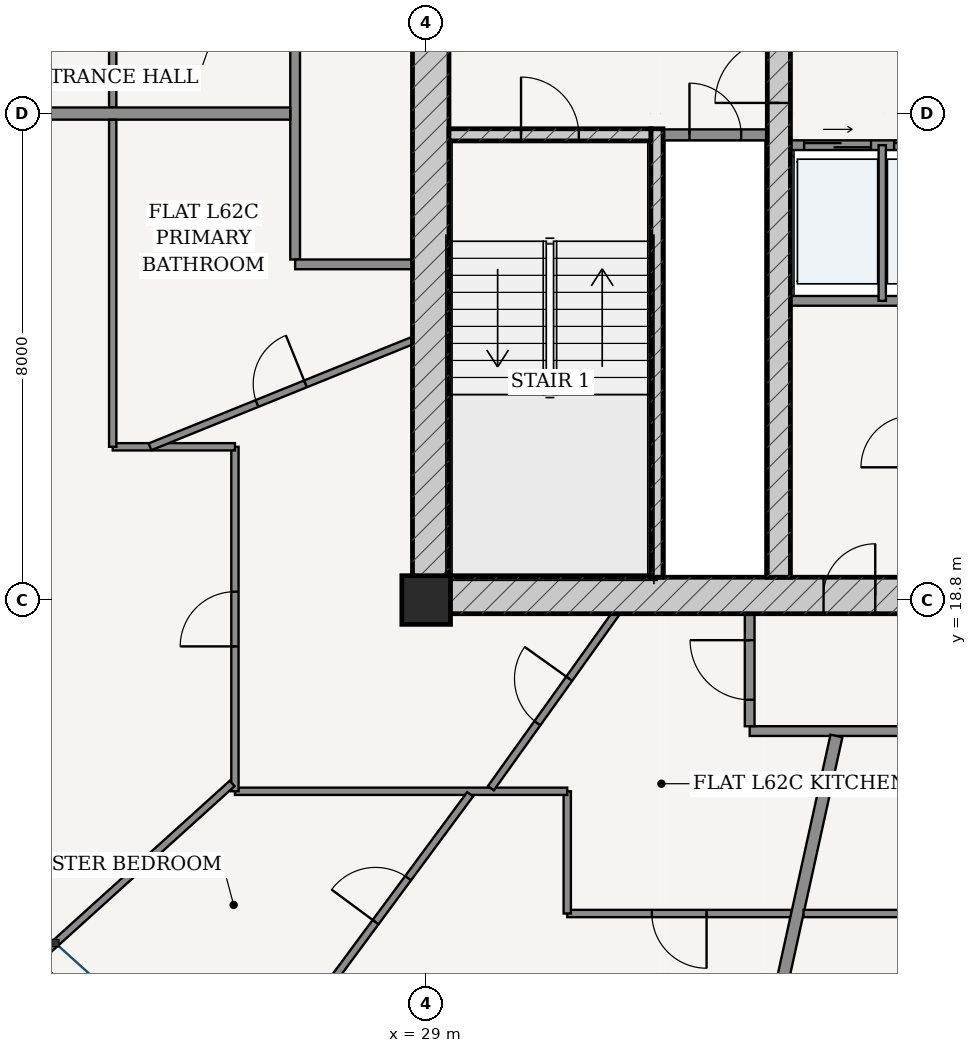
"""IFC4 building model, lengths in metres.
Left out: names, types, materials, properties, quantities, classifications, styles, units other than length and angle.
Written with IfcOpenShell. Run it as: python <this file> out.ifc"""

import sys

from ifc_helpers import new_model, si_unit, direction, frame, frame_2d, origin, origin_2d, place, context, subcontext, project, spatial, rectangle, extrude, source, transform, mapped, element, fill, save


model = new_model("IFC4")
c1 = context("Model", 3, precision=1e-05, world=origin(), true_north=direction((-0.2419218956, 0.970295726276)))
c2 = subcontext(c1, "Body", "Model", "MODEL_VIEW")
j1 = project(units=[si_unit("LENGTHUNIT", "METRE"), si_unit("PLANEANGLEUNIT", "RADIAN")], contexts=[c1])
p1 = place(None, origin())
s1 = spatial("IfcSite", under=j1, at=p1, CompositionType="ELEMENT")
p2 = place(p1, origin())
s2 = spatial("IfcBuilding", under=s1, at=p2, CompositionType="ELEMENT")
p3 = place(p2, frame((0.0, 0.0, 235.6)))
s3 = spatial("IfcBuildingStorey", under=s2, at=p3, CompositionType="ELEMENT", Elevation=235.6)
p4 = place(p3, frame((29.0, 18.8, 0.0), z_axis=(0.0, 0.0, 1.0), x_axis=(1.0, 0.0, 0.0)))
e1 = element("IfcColumn", 1, at=p4, inside=s3, PredefinedType="COLUMN", context=c2, shape_type="SweptSolid", body=[
    extrude(rectangle(XDim=0.8, YDim=0.8, at=origin_2d()), origin(), (0.0, 0.0, 1.0), 3.7),
])
p5 = place(p3, frame((28.775, 18.875, 0.0), z_axis=(0.0, 0.0, 1.0), x_axis=(1.0, 0.0, 0.0)))
e2 = element("IfcWall", 2, at=p5, inside=s3, PredefinedType="SHEAR", context=c2, shape_type="SweptSolid", body=[
    extrude(rectangle(XDim=18.45, YDim=0.6, at=frame_2d((9.225, 0.0))), origin(), (0.0, 0.0, 1.0), 3.435),
])
p6 = place(p5, frame((6.76, 0.0, 0.0)))
e3 = element("IfcOpeningElement", 3, at=p6, cuts=e2, PredefinedType="OPENING", context=c2, shape_type="SweptSolid", body=[
    extrude(rectangle(XDim=0.85, YDim=2.1, at=frame_2d((0.425, 1.05))), frame((0.0, 0.31, 0.0), z_axis=(0.0, -1.0, 0.0), x_axis=(1.0, 0.0, 0.0)), (0.0, 0.0, 1.0), 0.62),
])
p7 = place(p5, frame((8.8, 0.0, 0.0)))
e4 = element("IfcOpeningElement", 4, at=p7, cuts=e2, PredefinedType="OPENING", context=c2, shape_type="SweptSolid", body=[
    extrude(rectangle(XDim=0.85, YDim=2.1, at=frame_2d((0.425, 1.05))), frame((0.0, 0.31, 0.0), z_axis=(0.0, -1.0, 0.0), x_axis=(1.0, 0.0, 0.0)), (0.0, 0.0, 1.0), 0.62),
])
p8 = place(p5, frame((10.84, 0.0, 0.0)))
e5 = element("IfcOpeningElement", 5, at=p8, cuts=e2, PredefinedType="OPENING", context=c2, shape_type="SweptSolid", body=[
    extrude(rectangle(XDim=0.85, YDim=2.1, at=frame_2d((0.425, 1.05))), frame((0.0, 0.31, 0.0), z_axis=(0.0, -1.0, 0.0), x_axis=(1.0, 0.0, 0.0)), (0.0, 0.0, 1.0), 0.62),
])
p9 = place(p3, frame((29.075, 19.175, 0.0), z_axis=(0.0, 0.0, 1.0), x_axis=(0.0, 1.0, 0.0)))
e6 = element("IfcWall", 6, at=p9, inside=s3, PredefinedType="SHEAR", context=c2, shape_type="SweptSolid", body=[
    extrude(rectangle(XDim=15.25, YDim=0.6, at=frame_2d((7.625, 0.0))), origin(), (0.0, 0.0, 1.0), 3.435),
])
p10 = place(p9, frame((9.875, 0.0, 0.0)))
e7 = element("IfcOpeningElement", 7, at=p10, cuts=e6, PredefinedType="OPENING", context=c2, shape_type="SweptSolid", body=[
    extrude(rectangle(XDim=1.5, YDim=2.2, at=frame_2d((0.75, 1.1))), frame((0.0, 0.31, 0.0), z_axis=(0.0, -1.0, 0.0), x_axis=(1.0, 0.0, 0.0)), (0.0, 0.0, 1.0), 0.62),
])
p11 = place(p3, frame((32.795, 19.175, 0.0), z_axis=(0.0, 0.0, 1.0), x_axis=(0.0, 1.0, 0.0)))
e8 = element("IfcWall", 8, at=p11, inside=s3, PredefinedType="SOLIDWALL", context=c2, shape_type="SweptSolid", body=[
    extrude(rectangle(XDim=7.375, YDim=0.2, at=frame_2d((3.688, 0.0))), origin(), (0.0, 0.0, 1.0), 3.435),
])
p12 = place(p3, frame((29.375, 26.45, 0.0), z_axis=(0.0, 0.0, 1.0), x_axis=(1.0, 0.0, 0.0)))
e9 = element("IfcWall", 9, at=p12, inside=s3, PredefinedType="SOLIDWALL", context=c2, shape_type="SweptSolid", body=[
    extrude(rectangle(XDim=3.32, YDim=0.2, at=frame_2d((1.66, 0.0))), origin(), (0.0, 0.0, 1.0), 3.435),
])
p13 = place(p12, frame((1.185, 0.0, 0.0)))
e10 = element("IfcOpeningElement", 10, at=p13, cuts=e9, PredefinedType="OPENING", context=c2, shape_type="SweptSolid", body=[
    extrude(rectangle(XDim=0.95, YDim=2.15, at=frame_2d((0.475, 1.075))), frame((0.0, 0.11, 0.0), z_axis=(0.0, -1.0, 0.0), x_axis=(1.0, 0.0, 0.0)), (0.0, 0.0, 1.0), 0.22),
])
p14 = place(p3, frame((34.8, 19.175, 0.0), z_axis=(0.0, 0.0, 1.0), x_axis=(0.0, 1.0, 0.0)))
e11 = element("IfcWall", 11, at=p14, inside=s3, PredefinedType="SHEAR", context=c2, shape_type="SweptSolid", body=[
    extrude(rectangle(XDim=15.25, YDim=0.38, at=frame_2d((7.625, 0.0))), origin(), (0.0, 0.0, 1.0), 3.435),
])
p15 = place(p14, frame((7.8, 0.0, 0.0)))
e12 = element("IfcOpeningElement", 12, at=p15, cuts=e11, PredefinedType="OPENING", context=c2, shape_type="SweptSolid", body=[
    extrude(rectangle(XDim=1.05, YDim=2.15, at=frame_2d((0.525, 1.075))), frame((0.0, 0.2, 0.0), z_axis=(0.0, -1.0, 0.0), x_axis=(1.0, 0.0, 0.0)), (0.0, 0.0, 1.0), 0.4),
])
p16 = place(p3, frame((32.9, 26.45, 0.0), z_axis=(0.0, 0.0, 1.0), x_axis=(1.0, 0.0, 0.0)))
e13 = element("IfcWall", 13, at=p16, inside=s3, PredefinedType="PARTITIONING", context=c2, shape_type="SweptSolid", body=[
    extrude(rectangle(XDim=1.71, YDim=0.18, at=frame_2d((0.855, 0.0))), origin(), (0.0, 0.0, 1.0), 3.435),
])
p17 = place(p16, frame((0.43, 0.0, 0.0)))
e14 = element("IfcOpeningElement", 14, at=p17, cuts=e13, PredefinedType="OPENING", context=c2, shape_type="SweptSolid", body=[
    extrude(rectangle(XDim=0.85, YDim=2.1, at=frame_2d((0.425, 1.05))), frame((0.0, 0.1, 0.0), z_axis=(0.0, -1.0, 0.0), x_axis=(1.0, 0.0, 0.0)), (0.0, 0.0, 1.0), 0.2),
])
p18 = place(p3, frame((34.99, 26.28, 0.0), z_axis=(0.0, 0.0, 1.0), x_axis=(1.0, 0.0, 0.0)))
e15 = element("IfcWall", 15, at=p18, inside=s3, PredefinedType="PARTITIONING", context=c2, shape_type="SweptSolid", body=[
    extrude(rectangle(XDim=6.02, YDim=0.16, at=frame_2d((3.01, 0.0))), origin(), (0.0, 0.0, 1.0), 3.435),
])
p19 = place(p18, frame((0.225, 0.0, 0.0)))
e16 = element("IfcOpeningElement", 16, at=p19, cuts=e15, PredefinedType="OPENING", context=c2, shape_type="SweptSolid", body=[
    extrude(rectangle(XDim=1.1, YDim=2.2, at=frame_2d((0.55, 1.1))), frame((0.0, 0.09, 0.0), z_axis=(0.0, -1.0, 0.0), x_axis=(1.0, 0.0, 0.0)), (0.0, 0.0, 1.0), 0.18),
])
p20 = place(p18, frame((1.705, 0.0, 0.0)))
e17 = element("IfcOpeningElement", 17, at=p20, cuts=e15, PredefinedType="OPENING", context=c2, shape_type="SweptSolid", body=[
    extrude(rectangle(XDim=1.1, YDim=2.2, at=frame_2d((0.55, 1.1))), frame((0.0, 0.09, 0.0), z_axis=(0.0, -1.0, 0.0), x_axis=(1.0, 0.0, 0.0)), (0.0, 0.0, 1.0), 0.18),
])
p21 = place(p3, frame((34.99, 23.72, 0.0), z_axis=(0.0, 0.0, 1.0), x_axis=(1.0, 0.0, 0.0)))
e18 = element("IfcWall", 18, at=p21, inside=s3, PredefinedType="PARTITIONING", context=c2, shape_type="SweptSolid", body=[
    extrude(rectangle(XDim=6.02, YDim=0.16, at=frame_2d((3.01, 0.0))), origin(), (0.0, 0.0, 1.0), 3.435),
])
p22 = place(p3, frame((36.5, 23.72, 0.0), z_axis=(0.0, 0.0, 1.0), x_axis=(0.0, 1.0, 0.0)))
e19 = element("IfcWall", 19, at=p22, inside=s3, PredefinedType="PARTITIONING", context=c2, shape_type="SweptSolid", body=[
    extrude(rectangle(XDim=2.56, YDim=0.12, at=frame_2d((1.28, 0.0))), origin(), (0.0, 0.0, 1.0), 3.435),
])
p23 = place(p3, frame((26.845, 24.4, 0.0), z_axis=(0.0, 0.0, 1.0), x_axis=(0.0, 1.0, 0.0)))
e20 = element("IfcWall", 20, at=p23, inside=s3, PredefinedType="PARTITIONING", context=c2, shape_type="SweptSolid", body=[
    extrude(rectangle(XDim=10.625, YDim=0.16, at=frame_2d((5.312, 0.0))), origin(), (0.0, 0.0, 1.0), 2.951),
])
p24 = place(p23, frame((4.936, 0.0, 0.0)))
e21 = element("IfcOpeningElement", 21, at=p24, cuts=e20, PredefinedType="OPENING", context=c2, shape_type="SweptSolid", body=[
    extrude(rectangle(XDim=0.98, YDim=2.2, at=frame_2d((0.49, 1.1))), frame((0.0, 0.09, 0.0), z_axis=(0.0, -1.0, 0.0), x_axis=(1.0, 0.0, 0.0)), (0.0, 0.0, 1.0), 0.18),
])
p25 = place(p3, frame((26.845, 24.32, 0.0), z_axis=(0.0, 0.0, 1.0), x_axis=(1.0, 0.0, 0.0)))
e22 = element("IfcWall", 22, at=p25, inside=s3, PredefinedType="PARTITIONING", context=c2, shape_type="SweptSolid", body=[
    extrude(rectangle(XDim=1.93, YDim=0.16, at=frame_2d((0.965, 0.0))), origin(), (0.0, 0.0, 1.0), 3.435),
])
p26 = place(p3, frame((34.32, 16.645, 0.0), z_axis=(0.0, 0.0, 1.0), x_axis=(1.0, 0.0, 0.0)))
e23 = element("IfcWall", 23, at=p26, inside=s3, PredefinedType="PARTITIONING", context=c2, shape_type="SweptSolid", body=[
    extrude(rectangle(XDim=14.835, YDim=0.16, at=frame_2d((7.417, 0.0))), origin(), (0.0, 0.0, 1.0), 2.951),
])
p27 = place(p26, frame((9.928, 0.0, 0.0)))
e24 = element("IfcOpeningElement", 24, at=p27, cuts=e23, PredefinedType="OPENING", context=c2, shape_type="SweptSolid", body=[
    extrude(rectangle(XDim=0.98, YDim=2.2, at=frame_2d((0.49, 1.1))), frame((0.0, 0.09, 0.0), z_axis=(0.0, -1.0, 0.0), x_axis=(1.0, 0.0, 0.0)), (0.0, 0.0, 1.0), 0.18),
])
p28 = place(p3, frame((34.32, 16.725, 0.0), z_axis=(0.0, 0.0, 1.0), x_axis=(0.0, 1.0, 0.0)))
e25 = element("IfcWall", 25, at=p28, inside=s3, PredefinedType="PARTITIONING", context=c2, shape_type="SweptSolid", body=[
    extrude(rectangle(XDim=1.85, YDim=0.16, at=frame_2d((0.925, 0.0))), origin(), (0.0, 0.0, 1.0), 3.435),
])
p29 = place(p28, frame((0.435, 0.0, 0.0)))
e26 = element("IfcOpeningElement", 26, at=p29, cuts=e25, PredefinedType="OPENING", context=c2, shape_type="SweptSolid", body=[
    extrude(rectangle(XDim=0.98, YDim=2.2, at=frame_2d((0.49, 1.1))), frame((0.0, 0.09, 0.0), z_axis=(0.0, -1.0, 0.0), x_axis=(1.0, 0.0, 0.0)), (0.0, 0.0, 1.0), 0.18),
])
p30 = place(p3, frame((23.845, 26.902, 0.0), z_axis=(0.0, 0.0, 1.0), x_axis=(0.0, 1.0, 0.0)))
e27 = element("IfcWall", 27, at=p30, inside=s3, PredefinedType="PARTITIONING", context=c2, shape_type="SweptSolid", body=[
    extrude(rectangle(XDim=11.203, YDim=0.12, at=frame_2d((5.602, 0.0))), origin(), (0.0, 0.0, 1.0), 2.951),
])
p31 = place(p30, frame((2.276, 0.0, 0.0)))
e28 = element("IfcOpeningElement", 28, at=p31, cuts=e27, PredefinedType="OPENING", context=c2, shape_type="SweptSolid", body=[
    extrude(rectangle(XDim=0.9, YDim=2.15, at=frame_2d((0.45, 1.075))), frame((0.0, 0.07, 0.0), z_axis=(0.0, -1.0, 0.0), x_axis=(1.0, 0.0, 0.0)), (0.0, 0.0, 1.0), 0.14),
])
p32 = place(p3, frame((26.765, 26.8, 0.0), z_axis=(0.0, 0.0, 1.0), x_axis=(-1.0, 0.0, 0.0)))
e29 = element("IfcWall", 29, at=p32, inside=s3, PredefinedType="PARTITIONING", context=c2, shape_type="SweptSolid", body=[
    extrude(rectangle(XDim=10.505, YDim=0.2, at=frame_2d((5.252, 0.0))), origin(), (0.0, 0.0, 1.0), 2.951),
])
p33 = place(p3, frame((35.002, 13.645, 0.0), z_axis=(0.0, 0.0, 1.0), x_axis=(-1.0, 0.0, 0.0)))
e30 = element("IfcWall", 30, at=p33, inside=s3, PredefinedType="PARTITIONING", context=c2, shape_type="SweptSolid", body=[
    extrude(rectangle(XDim=3.682, YDim=0.12, at=frame_2d((1.841, 0.0))), origin(), (0.0, 0.0, 1.0), 2.951),
])
p34 = place(p33, frame((1.391, 0.0, 0.0)))
e31 = element("IfcOpeningElement", 31, at=p34, cuts=e30, PredefinedType="OPENING", context=c2, shape_type="SweptSolid", body=[
    extrude(rectangle(XDim=0.9, YDim=2.15, at=frame_2d((0.45, 1.075))), frame((0.0, 0.07, 0.0), z_axis=(0.0, -1.0, 0.0), x_axis=(1.0, 0.0, 0.0)), (0.0, 0.0, 1.0), 0.14),
])
p35 = place(p3, frame((31.32, 13.645, 0.0), z_axis=(0.0, 0.0, 1.0), x_axis=(0.0, 1.0, 0.0)))
e32 = element("IfcWall", 32, at=p35, inside=s3, PredefinedType="PARTITIONING", context=c2, shape_type="SweptSolid", body=[
    extrude(rectangle(XDim=2.01, YDim=0.12, at=frame_2d((1.005, 0.0))), origin(), (0.0, 0.0, 1.0), 3.11),
])
p36 = place(p3, frame((31.32, 15.655, 0.0), z_axis=(0.0, 0.0, 1.0), x_axis=(-1.0, 0.0, 0.0)))
e33 = element("IfcWall", 33, at=p36, inside=s3, PredefinedType="PARTITIONING", context=c2, shape_type="SweptSolid", body=[
    extrude(rectangle(XDim=5.465, YDim=0.12, at=frame_2d((2.732, 0.0))), origin(), (0.0, 0.0, 1.0), 2.951),
])
p37 = place(p3, frame((25.855, 15.655, 0.0), z_axis=(0.0, 0.0, 1.0), x_axis=(0.0, 1.0, 0.0)))
e34 = element("IfcWall", 34, at=p37, inside=s3, PredefinedType="PARTITIONING", context=c2, shape_type="SweptSolid", body=[
    extrude(rectangle(XDim=5.665, YDim=0.12, at=frame_2d((2.833, 0.0))), origin(), (0.0, 0.0, 1.0), 2.951),
])
p38 = place(p37, frame((2.383, 0.0, 0.0)))
e35 = element("IfcOpeningElement", 35, at=p38, cuts=e34, PredefinedType="OPENING", context=c2, shape_type="SweptSolid", body=[
    extrude(rectangle(XDim=0.9, YDim=2.15, at=frame_2d((0.45, 1.075))), frame((0.0, 0.07, 0.0), z_axis=(0.0, -1.0, 0.0), x_axis=(1.0, 0.0, 0.0)), (0.0, 0.0, 1.0), 0.14),
])
p39 = place(p3, frame((25.855, 21.32, 0.0), z_axis=(0.0, 0.0, 1.0), x_axis=(-1.0, 0.0, 0.0)))
e36 = element("IfcWall", 36, at=p39, inside=s3, PredefinedType="PARTITIONING", context=c2, shape_type="SweptSolid", body=[
    extrude(rectangle(XDim=2.01, YDim=0.12, at=frame_2d((1.005, 0.0))), origin(), (0.0, 0.0, 1.0), 3.11),
])
p40 = place(p3, frame((23.845, 21.32, 0.0), z_axis=(0.0, 0.0, 1.0), x_axis=(0.0, 1.0, 0.0)))
e37 = element("IfcWall", 37, at=p40, inside=s3, PredefinedType="PARTITIONING", context=c2, shape_type="SweptSolid", body=[
    extrude(rectangle(XDim=5.378, YDim=0.12, at=frame_2d((2.689, 0.0))), origin(), (0.0, 0.0, 1.0), 2.951),
])
p41 = place(p3, frame((25.809, 15.783, 0.0), z_axis=(0.0, 0.0, 1.0), x_axis=(-0.741938009522, -0.670468485483, 0.0)))
e38 = element("IfcWall", 38, at=p41, inside=s3, PredefinedType="PARTITIONING", context=c2, shape_type="SweptSolid", body=[
    extrude(rectangle(XDim=4.284, YDim=0.12, at=frame_2d((2.142, 0.0))), origin(), (0.0, 0.0, 1.0), 2.951),
])
p42 = place(p3, frame((29.722, 15.605, 0.0), z_axis=(0.0, 0.0, 1.0), x_axis=(-0.594518724985, -0.80408176552, 0.0)))
e39 = element("IfcWall", 39, at=p42, inside=s3, PredefinedType="PARTITIONING", context=c2, shape_type="SweptSolid", body=[
    extrude(rectangle(XDim=6.344, YDim=0.12, at=frame_2d((3.172, 0.0))), origin(), (0.0, 0.0, 1.0), 2.951),
])
p43 = place(p42, frame((1.714, 0.0, 0.0)))
e40 = element("IfcOpeningElement", 40, at=p43, cuts=e39, PredefinedType="OPENING", context=c2, shape_type="SweptSolid", body=[
    extrude(rectangle(XDim=0.9, YDim=2.15, at=frame_2d((0.45, 1.075))), frame((0.0, 0.07, 0.0), z_axis=(0.0, -1.0, 0.0), x_axis=(1.0, 0.0, 0.0)), (0.0, 0.0, 1.0), 0.14),
])
p44 = place(p3, frame((28.775, 23.067, 0.0), z_axis=(0.0, 0.0, 1.0), x_axis=(-0.926979373422, -0.375112304851, 0.0)))
e41 = element("IfcWall", 41, at=p44, inside=s3, PredefinedType="PARTITIONING", context=c2, shape_type="SweptSolid", body=[
    extrude(rectangle(XDim=4.656, YDim=0.12, at=frame_2d((2.328, 0.0))), origin(), (0.0, 0.0, 1.0), 3.435),
])
p45 = place(p44, frame((1.898, 0.0, 0.0)))
e42 = element("IfcOpeningElement", 42, at=p45, cuts=e41, PredefinedType="OPENING", context=c2, shape_type="SweptSolid", body=[
    extrude(rectangle(XDim=0.86, YDim=2.15, at=frame_2d((0.43, 1.075))), frame((0.0, 0.07, 0.0), z_axis=(0.0, -1.0, 0.0), x_axis=(1.0, 0.0, 0.0)), (0.0, 0.0, 1.0), 0.14),
])
p46 = place(p3, frame((32.117, 18.575, 0.0), z_axis=(0.0, 0.0, 1.0), x_axis=(-0.581800974427, -0.81333119094, 0.0)))
e43 = element("IfcWall", 43, at=p46, inside=s3, PredefinedType="PARTITIONING", context=c2, shape_type="SweptSolid", body=[
    extrude(rectangle(XDim=3.528, YDim=0.12, at=frame_2d((1.764, 0.0))), origin(), (0.0, 0.0, 1.0), 3.435),
])
p47 = place(p46, frame((1.314, 0.0, 0.0)))
e44 = element("IfcOpeningElement", 44, at=p47, cuts=e43, PredefinedType="OPENING", context=c2, shape_type="SweptSolid", body=[
    extrude(rectangle(XDim=0.9, YDim=2.15, at=frame_2d((0.45, 1.075))), frame((0.0, 0.07, 0.0), z_axis=(0.0, -1.0, 0.0), x_axis=(1.0, 0.0, 0.0)), (0.0, 0.0, 1.0), 0.14),
])
p48 = place(p3, frame((35.747, 16.565, 0.0), z_axis=(0.0, 0.0, 1.0), x_axis=(-0.214957946814, -0.976623305631, 0.0)))
e45 = element("IfcWall", 45, at=p48, inside=s3, PredefinedType="PARTITIONING", context=c2, shape_type="SweptSolid", body=[
    extrude(rectangle(XDim=9.202, YDim=0.2, at=frame_2d((4.601, 0.0))), origin(), (0.0, 0.0, 1.0), 2.951),
])
p49 = place(p3, frame((52.155, 13.645, 0.0), z_axis=(0.0, 0.0, 1.0), x_axis=(-1.0, 0.0, 0.0)))
e46 = element("IfcWall", 46, at=p49, inside=s3, PredefinedType="PARTITIONING", context=c2, shape_type="SweptSolid", body=[
    extrude(rectangle(XDim=16.949, YDim=0.12, at=frame_2d((8.474, 0.0))), origin(), (0.0, 0.0, 1.0), 2.951),
])
p50 = place(p49, frame((7.192, 0.0, 0.0)))
e47 = element("IfcOpeningElement", 47, at=p50, cuts=e46, PredefinedType="OPENING", context=c2, shape_type="SweptSolid", body=[
    extrude(rectangle(XDim=0.9, YDim=2.15, at=frame_2d((0.45, 1.075))), frame((0.0, 0.07, 0.0), z_axis=(0.0, -1.0, 0.0), x_axis=(1.0, 0.0, 0.0)), (0.0, 0.0, 1.0), 0.14),
])
m1 = source(origin(), c2, "Body", "SweptSolid", [
    extrude(rectangle(XDim=1.05, YDim=2.15, at=frame_2d((0.525, 1.075))), frame((0.0, 0.025, 0.0), z_axis=(0.0, -1.0, 0.0), x_axis=(1.0, 0.0, 0.0)), (0.0, 0.0, 1.0), 0.05),
])
p51 = place(p15, origin())
e48 = element("IfcDoor", 48, at=p51, inside=s3, OperationType="SINGLE_SWING_LEFT", PredefinedType="DOOR", context=c2, shape_type="MappedRepresentation", body=[
    mapped(m1, transform((0.0, 0.0, 0.0), scale=1.0)),
])
fill(e12, e48)
m2 = source(origin(), c2, "Body", "SweptSolid", [
    extrude(rectangle(XDim=0.95, YDim=2.15, at=frame_2d((0.475, 1.075))), frame((0.0, 0.025, 0.0), z_axis=(0.0, -1.0, 0.0), x_axis=(1.0, 0.0, 0.0)), (0.0, 0.0, 1.0), 0.05),
])
p52 = place(p13, origin())
e49 = element("IfcDoor", 49, at=p52, inside=s3, OperationType="SINGLE_SWING_LEFT", PredefinedType="DOOR", context=c2, shape_type="MappedRepresentation", body=[
    mapped(m2, transform((0.0, 0.0, 0.0), scale=1.0)),
])
fill(e10, e49)
m3 = source(origin(), c2, "Body", "SweptSolid", [
    extrude(rectangle(XDim=0.85, YDim=2.1, at=frame_2d((0.425, 1.05))), frame((0.0, 0.025, 0.0), z_axis=(0.0, -1.0, 0.0), x_axis=(1.0, 0.0, 0.0)), (0.0, 0.0, 1.0), 0.05),
])
p53 = place(p17, origin())
e50 = element("IfcDoor", 50, at=p53, inside=s3, OperationType="SINGLE_SWING_LEFT", PredefinedType="DOOR", context=c2, shape_type="MappedRepresentation", body=[
    mapped(m3, transform((0.0, 0.0, 0.0), scale=1.0)),
])
fill(e14, e50)
p54 = place(p6, origin())
e51 = element("IfcDoor", 51, at=p54, inside=s3, OperationType="SINGLE_SWING_RIGHT", PredefinedType="DOOR", context=c2, shape_type="MappedRepresentation", body=[
    mapped(m3, transform((0.0, 0.0, 0.0), scale=1.0)),
])
fill(e3, e51)
m4 = source(origin(), c2, "Body", "SweptSolid", [
    extrude(rectangle(XDim=1.1, YDim=2.2, at=frame_2d((0.55, 1.1))), frame((0.0, 0.025, 0.0), z_axis=(0.0, -1.0, 0.0), x_axis=(1.0, 0.0, 0.0)), (0.0, 0.0, 1.0), 0.05),
])
p55 = place(p19, origin())
e52 = element("IfcDoor", 52, at=p55, inside=s3, OperationType="DOUBLE_DOOR_SLIDING", PredefinedType="DOOR", context=c2, shape_type="MappedRepresentation", body=[
    mapped(m4, transform((0.0, 0.0, 0.0), scale=1.0)),
])
fill(e16, e52)
p56 = place(p20, origin())
e53 = element("IfcDoor", 53, at=p56, inside=s3, OperationType="DOUBLE_DOOR_SLIDING", PredefinedType="DOOR", context=c2, shape_type="MappedRepresentation", body=[
    mapped(m4, transform((0.0, 0.0, 0.0), scale=1.0)),
])
fill(e17, e53)
m5 = source(origin(), c2, "Body", "SweptSolid", [
    extrude(rectangle(XDim=0.98, YDim=2.2, at=frame_2d((0.49, 1.1))), frame((0.0, 0.025, 0.0), z_axis=(0.0, -1.0, 0.0), x_axis=(1.0, 0.0, 0.0)), (0.0, 0.0, 1.0), 0.05),
])
p57 = place(p29, origin())
e54 = element("IfcDoor", 54, at=p57, inside=s3, OperationType="SINGLE_SWING_RIGHT", PredefinedType="DOOR", context=c2, shape_type="MappedRepresentation", body=[
    mapped(m5, transform((0.0, 0.0, 0.0), scale=1.0)),
])
fill(e26, e54)
m6 = source(origin(), c2, "Body", "SweptSolid", [
    extrude(rectangle(XDim=0.9, YDim=2.15, at=frame_2d((0.45, 1.075))), frame((0.0, 0.025, 0.0), z_axis=(0.0, -1.0, 0.0), x_axis=(1.0, 0.0, 0.0)), (0.0, 0.0, 1.0), 0.05),
])
p58 = place(p34, origin())
e55 = element("IfcDoor", 55, at=p58, inside=s3, OperationType="SINGLE_SWING_LEFT", PredefinedType="DOOR", context=c2, shape_type="MappedRepresentation", body=[
    mapped(m6, transform((0.0, 0.0, 0.0), scale=1.0)),
])
fill(e31, e55)
p59 = place(p47, frame((0.9, 0.0, 0.0), z_axis=(0.0, 0.0, 1.0), x_axis=(-1.0, 0.0, 0.0)))
e56 = element("IfcDoor", 56, at=p59, inside=s3, OperationType="SINGLE_SWING_RIGHT", PredefinedType="DOOR", context=c2, shape_type="MappedRepresentation", body=[
    mapped(m6, transform((0.0, 0.0, 0.0), scale=1.0)),
])
fill(e44, e56)
p60 = place(p43, frame((0.9, 0.0, 0.0), z_axis=(0.0, 0.0, 1.0), x_axis=(-1.0, 0.0, 0.0)))
e57 = element("IfcDoor", 57, at=p60, inside=s3, OperationType="SINGLE_SWING_LEFT", PredefinedType="DOOR", context=c2, shape_type="MappedRepresentation", body=[
    mapped(m6, transform((0.0, 0.0, 0.0), scale=1.0)),
])
fill(e40, e57)
m7 = source(origin(), c2, "Body", "SweptSolid", [
    extrude(rectangle(XDim=0.86, YDim=2.15, at=frame_2d((0.43, 1.075))), frame((0.0, 0.025, 0.0), z_axis=(0.0, -1.0, 0.0), x_axis=(1.0, 0.0, 0.0)), (0.0, 0.0, 1.0), 0.05),
])
p61 = place(p45, frame((0.86, 0.0, 0.0), z_axis=(0.0, 0.0, 1.0), x_axis=(-1.0, 0.0, 0.0)))
e58 = element("IfcDoor", 58, at=p61, inside=s3, OperationType="SINGLE_SWING_RIGHT", PredefinedType="DOOR", context=c2, shape_type="MappedRepresentation", body=[
    mapped(m7, transform((0.0, 0.0, 0.0), scale=1.0)),
])
fill(e42, e58)
p62 = place(p38, origin())
e59 = element("IfcDoor", 59, at=p62, inside=s3, OperationType="SINGLE_SWING_LEFT", PredefinedType="DOOR", context=c2, shape_type="MappedRepresentation", body=[
    mapped(m6, transform((0.0, 0.0, 0.0), scale=1.0)),
])
fill(e35, e59)
save(model, sys.argv[1])
